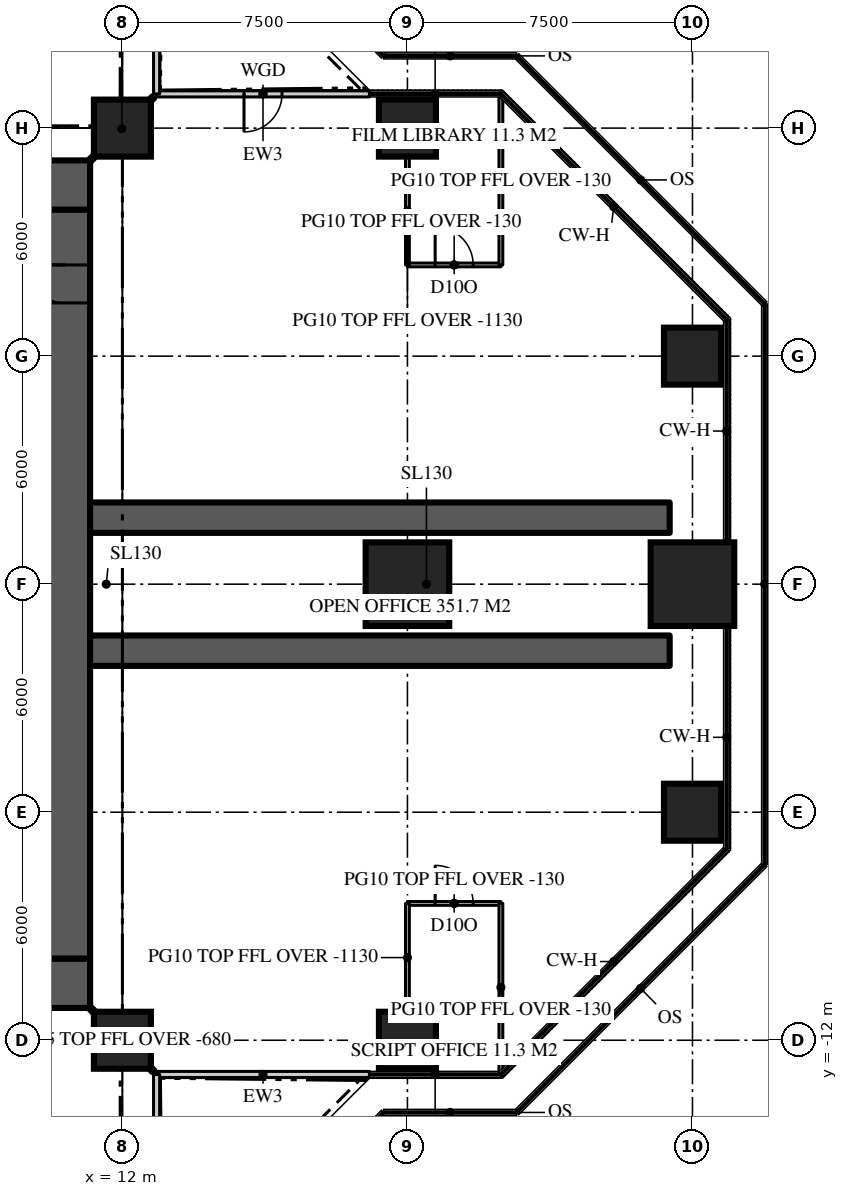
"""IFC4 building model, lengths in metres.
Left out: names, types, materials, properties, quantities, classifications, styles, units other than length and angle.
Written with IfcOpenShell. Run it as: python <this file> out.ifc"""

import sys

from ifc_helpers import new_model, si_unit, direction, frame, frame_2d, origin, origin_2d, place, context, subcontext, project, spatial, rectangle, extrude, element, fill, save


model = new_model("IFC4")
c1 = context("Model", 3, precision=1e-05, world=origin(), true_north=direction((0.0, 1.0)))
c2 = subcontext(c1, "Body", "Model", "MODEL_VIEW")
j1 = project(units=[si_unit("LENGTHUNIT", "METRE"), si_unit("PLANEANGLEUNIT", "RADIAN")], contexts=[c1])
p1 = place(None, origin())
s1 = spatial("IfcSite", under=j1, at=p1, CompositionType="ELEMENT")
p2 = place(p1, origin())
s2 = spatial("IfcBuilding", under=s1, at=p2, CompositionType="ELEMENT")
p3 = place(p2, frame((0.0, 0.0, 251.7)))
s3 = spatial("IfcBuildingStorey", under=s2, at=p3, CompositionType="ELEMENT", Elevation=251.7)
p4 = place(p3, frame((-11.15, 10.5, 0.0), z_axis=(0.0, 0.0, 1.0), x_axis=(1.0, 0.0, 0.0)))
e1 = element("IfcWall", 1, at=p4, inside=s3, PredefinedType="SHEAR", context=c2, shape_type="SweptSolid", body=[
    extrude(rectangle(XDim=22.3, YDim=1.3, at=frame_2d((11.15, 0.0))), origin(), (0.0, 0.0, 1.0), 3.9),
])
p5 = place(p4, frame((4.25, 0.0, 0.0)))
e2 = element("IfcOpeningElement", 2, at=p5, cuts=e1, PredefinedType="OPENING", context=c2, shape_type="SweptSolid", body=[
    extrude(rectangle(XDim=1.8, YDim=2.2, at=frame_2d((0.9, 1.1))), frame((0.0, 0.66, 0.0), z_axis=(0.0, -1.0, 0.0), x_axis=(1.0, 0.0, 0.0)), (0.0, 0.0, 1.0), 1.32),
])
p6 = place(p4, frame((16.25, 0.0, 0.0)))
e3 = element("IfcOpeningElement", 3, at=p6, cuts=e1, PredefinedType="OPENING", context=c2, shape_type="SweptSolid", body=[
    extrude(rectangle(XDim=1.8, YDim=2.2, at=frame_2d((0.9, 1.1))), frame((0.0, 0.66, 0.0), z_axis=(0.0, -1.0, 0.0), x_axis=(1.0, 0.0, 0.0)), (0.0, 0.0, 1.0), 1.32),
])
p7 = place(p3, frame((11.15, -10.5, 0.0), z_axis=(0.0, 0.0, 1.0), x_axis=(-1.0, 0.0, 0.0)))
e4 = element("IfcWall", 4, at=p7, inside=s3, PredefinedType="SHEAR", context=c2, shape_type="SweptSolid", body=[
    extrude(rectangle(XDim=22.3, YDim=1.3, at=frame_2d((11.15, 0.0))), origin(), (0.0, 0.0, 1.0), 3.9),
])
p8 = place(p7, frame((16.25, 0.0, 0.0)))
e5 = element("IfcOpeningElement", 5, at=p8, cuts=e4, PredefinedType="OPENING", context=c2, shape_type="SweptSolid", body=[
    extrude(rectangle(XDim=1.8, YDim=2.2, at=frame_2d((0.9, 1.1))), frame((0.0, 0.66, 0.0), z_axis=(0.0, -1.0, 0.0), x_axis=(1.0, 0.0, 0.0)), (0.0, 0.0, 1.0), 1.32),
])
p9 = place(p7, frame((4.25, 0.0, 0.0)))
e6 = element("IfcOpeningElement", 6, at=p9, cuts=e4, PredefinedType="OPENING", context=c2, shape_type="SweptSolid", body=[
    extrude(rectangle(XDim=1.8, YDim=2.2, at=frame_2d((0.9, 1.1))), frame((0.0, 0.66, 0.0), z_axis=(0.0, -1.0, 0.0), x_axis=(1.0, 0.0, 0.0)), (0.0, 0.0, 1.0), 1.32),
])
p10 = place(p3, frame((10.5, -9.85, 0.0), z_axis=(0.0, 0.0, 1.0), x_axis=(0.0, 1.0, 0.0)))
e7 = element("IfcWall", 7, at=p10, inside=s3, PredefinedType="SHEAR", context=c2, shape_type="SweptSolid", body=[
    extrude(rectangle(XDim=19.7, YDim=1.3, at=frame_2d((9.85, 0.0))), origin(), (0.0, 0.0, 1.0), 3.9),
])
p11 = place(p10, frame((17.25, 0.0, 0.0)))
e8 = element("IfcOpeningElement", 8, at=p11, cuts=e7, PredefinedType="OPENING", context=c2, shape_type="SweptSolid", body=[
    extrude(rectangle(XDim=1.0, YDim=2.2, at=frame_2d((0.5, 1.1))), frame((0.0, 0.66, 0.0), z_axis=(0.0, -1.0, 0.0), x_axis=(1.0, 0.0, 0.0)), (0.0, 0.0, 1.0), 1.32),
])
for number, where, z_axis, x_axis in (
    (9, (11.15, -1.75, 0.0), (0.0, 0.0, 1.0), (1.0, 0.0, 0.0)),
    (10, (11.15, 1.75, 0.0), (0.0, 0.0, 1.0), (1.0, 0.0, 0.0)),
):
    element("IfcWall", number, at=place(p3, frame(where, z_axis=z_axis, x_axis=x_axis)), inside=s3, PredefinedType="SHEAR", context=c2, shape_type="SweptSolid", body=[
        extrude(rectangle(XDim=15.25, YDim=0.8, at=frame_2d((7.625, 0.0))), origin(), (0.0, 0.0, 1.0), 3.9),
    ])
for number, where, z_axis, x_axis in (
    (11, (12.0, -12.0, 0.0), (0.0, 0.0, 1.0), (1.0, 0.0, 0.0)),
    (12, (19.5, -12.0, 0.0), (0.0, 0.0, 1.0), (1.0, 0.0, 0.0)),
    (13, (27.0, -6.0, 0.0), (0.0, 0.0, 1.0), (1.0, 0.0, 0.0)),
):
    element("IfcColumn", number, at=place(p3, frame(where, z_axis=z_axis, x_axis=x_axis)), inside=s3, PredefinedType="COLUMN", context=c2, shape_type="SweptSolid", body=[
        extrude(rectangle(XDim=1.5, YDim=1.5, at=origin_2d()), origin(), (0.0, 0.0, 1.0), 3.9),
    ])
for number, where, z_axis, x_axis in (
    (14, (19.5, 0.0, 0.0), (0.0, 0.0, 1.0), (1.0, 0.0, 0.0)),
    (15, (27.0, 0.0, 0.0), (0.0, 0.0, 1.0), (1.0, 0.0, 0.0)),
):
    element("IfcColumn", number, at=place(p3, frame(where, z_axis=z_axis, x_axis=x_axis)), inside=s3, PredefinedType="COLUMN", context=c2, shape_type="SweptSolid", body=[
        extrude(rectangle(XDim=2.2, YDim=2.2, at=origin_2d()), origin(), (0.0, 0.0, 1.0), 3.9),
    ])
for number, where, z_axis, x_axis in (
    (16, (27.0, 6.0, 0.0), (0.0, 0.0, 1.0), (1.0, 0.0, 0.0)),
    (17, (12.0, 12.0, 0.0), (0.0, 0.0, 1.0), (1.0, 0.0, 0.0)),
    (18, (19.5, 12.0, 0.0), (0.0, 0.0, 1.0), (1.0, 0.0, 0.0)),
):
    element("IfcColumn", number, at=place(p3, frame(where, z_axis=z_axis, x_axis=x_axis)), inside=s3, PredefinedType="COLUMN", context=c2, shape_type="SweptSolid", body=[
        extrude(rectangle(XDim=1.5, YDim=1.5, at=origin_2d()), origin(), (0.0, 0.0, 1.0), 3.9),
    ])
p12 = place(p3, frame((12.9, -12.9, 0.0), z_axis=(0.0, 0.0, 1.0), x_axis=(1.0, 0.0, 0.0)))
e19 = element("IfcWall", 19, at=p12, inside=s3, PredefinedType="SOLIDWALL", context=c2, shape_type="SweptSolid", body=[
    extrude(rectangle(XDim=5.6, YDim=0.16, at=frame_2d((2.8, 0.0))), origin(), (0.0, 0.0, 1.0), 3.77),
])
p13 = place(p3, frame((18.5, 12.9, 0.0), z_axis=(0.0, 0.0, 1.0), x_axis=(-1.0, 0.0, 0.0)))
e20 = element("IfcWall", 20, at=p13, inside=s3, PredefinedType="SOLIDWALL", context=c2, shape_type="SweptSolid", body=[
    extrude(rectangle(XDim=5.6, YDim=0.16, at=frame_2d((2.8, 0.0))), origin(), (0.0, 0.0, 1.0), 3.77),
])
p14 = place(p13, frame((2.3, 0.0, 0.0)))
e21 = element("IfcOpeningElement", 21, at=p14, cuts=e20, PredefinedType="OPENING", context=c2, shape_type="SweptSolid", body=[
    extrude(rectangle(XDim=1.0, YDim=2.2, at=frame_2d((0.5, 1.1))), frame((0.0, 0.09, 0.0), z_axis=(0.0, -1.0, 0.0), x_axis=(1.0, 0.0, 0.0)), (0.0, 0.0, 1.0), 0.18),
])
p15 = place(p3, frame((12.9, 12.9, 0.0), z_axis=(0.0, 0.0, 1.0), x_axis=(0.0, 1.0, 0.0)))
e22 = element("IfcWall", 22, at=p15, inside=s3, PredefinedType="SOLIDWALL", context=c2, shape_type="SweptSolid", body=[
    extrude(rectangle(XDim=5.6, YDim=0.16, at=frame_2d((2.8, 0.0))), origin(), (0.0, 0.0, 1.0), 3.77),
])
p16 = place(p3, frame((12.9, -18.5, 0.0), z_axis=(0.0, 0.0, 1.0), x_axis=(0.0, 1.0, 0.0)))
e23 = element("IfcWall", 23, at=p16, inside=s3, PredefinedType="SOLIDWALL", context=c2, shape_type="SweptSolid", body=[
    extrude(rectangle(XDim=5.6, YDim=0.16, at=frame_2d((2.8, 0.0))), origin(), (0.0, 0.0, 1.0), 3.77),
])
p17 = place(p16, frame((2.3, 0.0, 0.0)))
e24 = element("IfcOpeningElement", 24, at=p17, cuts=e23, PredefinedType="OPENING", context=c2, shape_type="SweptSolid", body=[
    extrude(rectangle(XDim=1.0, YDim=2.2, at=frame_2d((0.5, 1.1))), frame((0.0, 0.09, 0.0), z_axis=(0.0, -1.0, 0.0), x_axis=(1.0, 0.0, 0.0)), (0.0, 0.0, 1.0), 0.18),
])
p18 = place(p3, frame((19.5, 8.4, 0.0), z_axis=(0.0, 0.0, 1.0), x_axis=(1.0, 0.0, 0.0)))
e25 = element("IfcWall", 25, at=p18, inside=s3, PredefinedType="PARTITIONING", context=c2, shape_type="SweptSolid", body=[
    extrude(rectangle(XDim=2.459, YDim=0.1, at=frame_2d((1.229, 0.0))), origin(), (0.0, 0.0, 1.0), 3.77),
])
p19 = place(p18, frame((0.729, 0.0, 0.0)))
e26 = element("IfcOpeningElement", 26, at=p19, cuts=e25, PredefinedType="OPENING", context=c2, shape_type="SweptSolid", body=[
    extrude(rectangle(XDim=1.0, YDim=2.2, at=frame_2d((0.5, 1.1))), frame((0.0, 0.06, 0.0), z_axis=(0.0, -1.0, 0.0), x_axis=(1.0, 0.0, 0.0)), (0.0, 0.0, 1.0), 0.12),
])
p20 = place(p3, frame((19.5, 8.4, 0.0), z_axis=(0.0, 0.0, 1.0), x_axis=(0.0, 1.0, 0.0)))
e27 = element("IfcWall", 27, at=p20, inside=s3, PredefinedType="PARTITIONING", context=c2, shape_type="SweptSolid", body=[
    extrude(rectangle(XDim=2.85, YDim=0.1, at=frame_2d((1.425, 0.0))), origin(), (0.0, 0.0, 1.0), 2.77),
])
p21 = place(p3, frame((21.959, 8.4, 0.0), z_axis=(0.0, 0.0, 1.0), x_axis=(0.0, 1.0, 0.0)))
e28 = element("IfcWall", 28, at=p21, inside=s3, PredefinedType="PARTITIONING", context=c2, shape_type="SweptSolid", body=[
    extrude(rectangle(XDim=4.42, YDim=0.1, at=frame_2d((2.21, 0.0))), origin(), (0.0, 0.0, 1.0), 3.77),
])
p22 = place(p3, frame((19.5, -8.4, 0.0), z_axis=(0.0, 0.0, 1.0), x_axis=(1.0, 0.0, 0.0)))
e29 = element("IfcWall", 29, at=p22, inside=s3, PredefinedType="PARTITIONING", context=c2, shape_type="SweptSolid", body=[
    extrude(rectangle(XDim=2.459, YDim=0.1, at=frame_2d((1.229, 0.0))), origin(), (0.0, 0.0, 1.0), 3.77),
])
p23 = place(p22, frame((0.729, 0.0, 0.0)))
e30 = element("IfcOpeningElement", 30, at=p23, cuts=e29, PredefinedType="OPENING", context=c2, shape_type="SweptSolid", body=[
    extrude(rectangle(XDim=1.0, YDim=2.2, at=frame_2d((0.5, 1.1))), frame((0.0, 0.06, 0.0), z_axis=(0.0, -1.0, 0.0), x_axis=(1.0, 0.0, 0.0)), (0.0, 0.0, 1.0), 0.12),
])
p24 = place(p3, frame((19.5, -8.4, 0.0), z_axis=(0.0, 0.0, 1.0), x_axis=(0.0, -1.0, 0.0)))
e31 = element("IfcWall", 31, at=p24, inside=s3, PredefinedType="PARTITIONING", context=c2, shape_type="SweptSolid", body=[
    extrude(rectangle(XDim=2.85, YDim=0.1, at=frame_2d((1.425, 0.0))), origin(), (0.0, 0.0, 1.0), 2.77),
])
p25 = place(p3, frame((21.959, -8.4, 0.0), z_axis=(0.0, 0.0, 1.0), x_axis=(0.0, -1.0, 0.0)))
e32 = element("IfcWall", 32, at=p25, inside=s3, PredefinedType="PARTITIONING", context=c2, shape_type="SweptSolid", body=[
    extrude(rectangle(XDim=4.42, YDim=0.1, at=frame_2d((2.21, 0.0))), origin(), (0.0, 0.0, 1.0), 3.77),
])
for number, where, z_axis, x_axis in (
    (33, (11.15, 11.15, 0.0), (0.0, 0.0, 1.0), (0.707, 0.707, 0.0)),
    (34, (11.15, -11.15, 0.0), (0.0, 0.0, 1.0), (0.707, -0.707, 0.0)),
):
    element("IfcWall", number, at=place(p3, frame(where, z_axis=z_axis, x_axis=x_axis)), inside=s3, PredefinedType="PARTITIONING", context=c2, shape_type="SweptSolid", body=[
        extrude(rectangle(XDim=2.362, YDim=0.15, at=frame_2d((1.181, 0.0))), origin(), (0.0, 0.0, 1.0), 3.22),
    ])
p26 = place(p14, origin())
e35 = element("IfcDoor", 35, at=p26, inside=s3, OperationType="SINGLE_SWING_RIGHT", PredefinedType="DOOR", context=c2, shape_type="SweptSolid", body=[
    extrude(rectangle(XDim=1.0, YDim=2.2, at=frame_2d((0.5, 1.1))), frame((0.0, 0.025, 0.0), z_axis=(0.0, -1.0, 0.0), x_axis=(1.0, 0.0, 0.0)), (0.0, 0.0, 1.0), 0.05),
])
fill(e21, e35)
p27 = place(p11, origin())
e36 = element("IfcDoor", 36, at=p27, inside=s3, OperationType="SINGLE_SWING_RIGHT", PredefinedType="DOOR", context=c2, shape_type="SweptSolid", body=[
    extrude(rectangle(XDim=1.0, YDim=2.2, at=frame_2d((0.5, 1.1))), frame((0.0, 0.025, 0.0), z_axis=(0.0, -1.0, 0.0), x_axis=(1.0, 0.0, 0.0)), (0.0, 0.0, 1.0), 0.05),
])
fill(e8, e36)
p28 = place(p19, origin())
e37 = element("IfcDoor", 37, at=p28, inside=s3, OperationType="SINGLE_SWING_LEFT", PredefinedType="DOOR", context=c2, shape_type="SweptSolid", body=[
    extrude(rectangle(XDim=1.0, YDim=2.2, at=frame_2d((0.5, 1.1))), frame((0.0, 0.025, 0.0), z_axis=(0.0, -1.0, 0.0), x_axis=(1.0, 0.0, 0.0)), (0.0, 0.0, 1.0), 0.05),
])
fill(e26, e37)
p29 = place(p23, origin())
e38 = element("IfcDoor", 38, at=p29, inside=s3, OperationType="SINGLE_SWING_LEFT", PredefinedType="DOOR", context=c2, shape_type="SweptSolid", body=[
    extrude(rectangle(XDim=1.0, YDim=2.2, at=frame_2d((0.5, 1.1))), frame((0.0, 0.025, 0.0), z_axis=(0.0, -1.0, 0.0), x_axis=(1.0, 0.0, 0.0)), (0.0, 0.0, 1.0), 0.05),
])
fill(e30, e38)
save(model, sys.argv[1])
